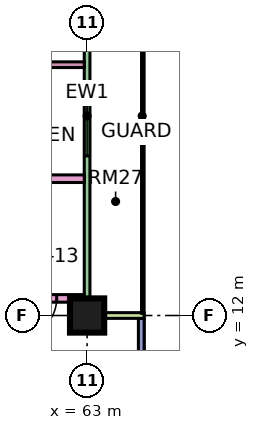
"""IFC4 building model, lengths in metres.
Left out: names, types, materials, properties, quantities, classifications, styles, units other than length and angle.
Written with IfcOpenShell. Run it as: python <this file> out.ifc"""

import sys

from ifc_helpers import new_model, si_unit, direction, frame, frame_2d, origin, origin_2d, place, context, subcontext, project, spatial, rectangle, extrude, element, fill, save


model = new_model("IFC4")
c1 = context("Model", 3, precision=1e-05, world=origin(), true_north=direction((0.0, 1.0)))
c2 = subcontext(c1, "Body", "Model", "MODEL_VIEW")
j1 = project(units=[si_unit("LENGTHUNIT", "METRE"), si_unit("PLANEANGLEUNIT", "RADIAN")], contexts=[c1])
p1 = place(None, origin())
s1 = spatial("IfcSite", under=j1, at=p1, CompositionType="ELEMENT")
p2 = place(p1, origin())
s2 = spatial("IfcBuilding", under=s1, at=p2, CompositionType="ELEMENT")
p3 = place(p2, frame((0.0, 0.0, 194.9)))
s3 = spatial("IfcBuildingStorey", under=s2, at=p3, CompositionType="ELEMENT", Elevation=194.9)
p4 = place(p3, frame((63.0, 12.0, 0.0), z_axis=(0.0, 0.0, 1.0), x_axis=(1.0, 0.0, 0.0)))
e1 = element("IfcColumn", 1, at=p4, inside=s3, PredefinedType="COLUMN", context=c2, shape_type="SweptSolid", body=[
    extrude(rectangle(XDim=0.9, YDim=0.9, at=origin_2d()), origin(), (0.0, 0.0, 1.0), 3.75),
])
p5 = place(p3, frame((64.425, 1.5, 0.0), z_axis=(0.0, 0.0, 1.0), x_axis=(0.0, 1.0, 0.0)))
e2 = element("IfcWall", 2, at=p5, inside=s3, PredefinedType="SOLIDWALL", context=c2, shape_type="SweptSolid", body=[
    extrude(rectangle(XDim=10.425, YDim=0.15, at=frame_2d((5.212, 0.0))), origin(), (0.0, 0.0, 1.0), 3.35),
])
p6 = place(p5, frame((3.712, 0.0, 0.45)))
e3 = element("IfcOpeningElement", 3, at=p6, cuts=e2, PredefinedType="OPENING", context=c2, shape_type="SweptSolid", body=[
    extrude(rectangle(XDim=3.0, YDim=2.4, at=frame_2d((1.5, 1.2))), frame((0.0, 0.085, 0.0), z_axis=(0.0, -1.0, 0.0), x_axis=(1.0, 0.0, 0.0)), (0.0, 0.0, 1.0), 0.17),
])
p7 = place(p3, frame((63.0, 12.075, 0.0), z_axis=(0.0, 0.0, 1.0), x_axis=(0.0, 1.0, 0.0)))
e4 = element("IfcWall", 4, at=p7, inside=s3, PredefinedType="SOLIDWALL", context=c2, shape_type="SweptSolid", body=[
    extrude(rectangle(XDim=10.35, YDim=0.15, at=frame_2d((5.175, 0.0))), origin(), (0.0, 0.0, 1.0), 3.35),
])
p8 = place(p7, frame((4.125, 0.0, 0.45)))
e5 = element("IfcOpeningElement", 5, at=p8, cuts=e4, PredefinedType="OPENING", context=c2, shape_type="SweptSolid", body=[
    extrude(rectangle(XDim=1.8, YDim=2.4, at=frame_2d((0.9, 1.2))), frame((0.0, 0.085, 0.0), z_axis=(0.0, -1.0, 0.0), x_axis=(1.0, 0.0, 0.0)), (0.0, 0.0, 1.0), 0.17),
])
p9 = place(p7, frame((8.137, 0.0, 0.45)))
e6 = element("IfcOpeningElement", 6, at=p9, cuts=e4, PredefinedType="OPENING", context=c2, shape_type="SweptSolid", body=[
    extrude(rectangle(XDim=1.8, YDim=2.4, at=frame_2d((0.9, 1.2))), frame((0.0, 0.085, 0.0), z_axis=(0.0, -1.0, 0.0), x_axis=(1.0, 0.0, 0.0)), (0.0, 0.0, 1.0), 0.17),
])
p10 = place(p3, frame((64.5, 12.0, 0.0), z_axis=(0.0, 0.0, 1.0), x_axis=(-1.0, 0.0, 0.0)))
e7 = element("IfcWall", 7, at=p10, inside=s3, PredefinedType="SOLIDWALL", context=c2, shape_type="SweptSolid", body=[
    extrude(rectangle(XDim=1.5, YDim=0.15, at=frame_2d((0.75, 0.0))), origin(), (0.0, 0.0, 1.0), 3.35),
])
p11 = place(p3, frame((40.65, 12.45, 0.0), z_axis=(0.0, 0.0, 1.0), x_axis=(1.0, 0.0, 0.0)))
e8 = element("IfcWall", 8, at=p11, inside=s3, PredefinedType="PARTITIONING", context=c2, shape_type="SweptSolid", body=[
    extrude(rectangle(XDim=22.276, YDim=0.2, at=frame_2d((11.138, 0.0))), origin(), (0.0, 0.0, 1.0), 3.35),
])
p12 = place(p11, frame((20.55, 0.0, 0.0)))
e9 = element("IfcOpeningElement", 9, at=p12, cuts=e8, PredefinedType="OPENING", context=c2, shape_type="SweptSolid", body=[
    extrude(rectangle(XDim=1.0, YDim=2.1, at=frame_2d((0.5, 1.05))), frame((0.0, 0.11, 0.0), z_axis=(0.0, -1.0, 0.0), x_axis=(1.0, 0.0, 0.0)), (0.0, 0.0, 1.0), 0.22),
])
p13 = place(p11, frame((1.05, 0.0, 0.0)))
e10 = element("IfcOpeningElement", 10, at=p13, cuts=e8, PredefinedType="OPENING", context=c2, shape_type="SweptSolid", body=[
    extrude(rectangle(XDim=1.0, YDim=2.1, at=frame_2d((0.5, 1.05))), frame((0.0, 0.11, 0.0), z_axis=(0.0, -1.0, 0.0), x_axis=(1.0, 0.0, 0.0)), (0.0, 0.0, 1.0), 0.22),
])
p14 = place(p3, frame((51.225, 15.6, 0.0), z_axis=(0.0, 0.0, 1.0), x_axis=(1.0, 0.0, 0.0)))
e11 = element("IfcWall", 11, at=p14, inside=s3, PredefinedType="PARTITIONING", context=c2, shape_type="SweptSolid", body=[
    extrude(rectangle(XDim=11.701, YDim=0.2, at=frame_2d((5.851, 0.0))), origin(), (0.0, 0.0, 1.0), 3.35),
])
p15 = place(p14, frame((3.575, 0.0, 0.0)))
e12 = element("IfcOpeningElement", 12, at=p15, cuts=e11, PredefinedType="OPENING", context=c2, shape_type="SweptSolid", body=[
    extrude(rectangle(XDim=1.0, YDim=2.1, at=frame_2d((0.5, 1.05))), frame((0.0, 0.11, 0.0), z_axis=(0.0, -1.0, 0.0), x_axis=(1.0, 0.0, 0.0)), (0.0, 0.0, 1.0), 0.22),
])
p16 = place(p14, frame((0.875, 0.0, 0.0)))
e13 = element("IfcOpeningElement", 13, at=p16, cuts=e11, PredefinedType="OPENING", context=c2, shape_type="SweptSolid", body=[
    extrude(rectangle(XDim=1.0, YDim=2.1, at=frame_2d((0.5, 1.05))), frame((0.0, 0.11, 0.0), z_axis=(0.0, -1.0, 0.0), x_axis=(1.0, 0.0, 0.0)), (0.0, 0.0, 1.0), 0.22),
])
p17 = place(p3, frame((56.625, 18.6, 0.0), z_axis=(0.0, 0.0, 1.0), x_axis=(1.0, 0.0, 0.0)))
e14 = element("IfcWall", 14, at=p17, inside=s3, PredefinedType="PARTITIONING", context=c2, shape_type="SweptSolid", body=[
    extrude(rectangle(XDim=6.301, YDim=0.15, at=frame_2d((3.15, 0.0))), origin(), (0.0, 0.0, 1.0), 3.35),
])
p18 = place(p17, frame((1.125, 0.0, 0.0)))
e15 = element("IfcOpeningElement", 15, at=p18, cuts=e14, PredefinedType="OPENING", context=c2, shape_type="SweptSolid", body=[
    extrude(rectangle(XDim=0.8, YDim=2.1, at=frame_2d((0.4, 1.05))), frame((0.0, 0.085, 0.0), z_axis=(0.0, -1.0, 0.0), x_axis=(1.0, 0.0, 0.0)), (0.0, 0.0, 1.0), 0.17),
])
p19 = place(p17, frame((4.275, 0.0, 0.0)))
e16 = element("IfcOpeningElement", 16, at=p19, cuts=e14, PredefinedType="OPENING", context=c2, shape_type="SweptSolid", body=[
    extrude(rectangle(XDim=0.9, YDim=2.1, at=frame_2d((0.45, 1.05))), frame((0.0, 0.085, 0.0), z_axis=(0.0, -1.0, 0.0), x_axis=(1.0, 0.0, 0.0)), (0.0, 0.0, 1.0), 0.17),
])
p20 = place(p8, origin())
e17 = element("IfcWindow", 17, at=p20, inside=s3, PartitioningType="SINGLE_PANEL", PredefinedType="WINDOW", context=c2, shape_type="SweptSolid", body=[
    extrude(rectangle(XDim=1.8, YDim=2.4, at=frame_2d((0.9, 1.2))), frame((0.0, 0.03, 0.0), z_axis=(0.0, -1.0, 0.0), x_axis=(1.0, 0.0, 0.0)), (0.0, 0.0, 1.0), 0.06),
])
fill(e5, e17)
p21 = place(p12, frame((1.0, 0.0, 0.0), z_axis=(0.0, 0.0, 1.0), x_axis=(-1.0, 0.0, 0.0)))
e18 = element("IfcDoor", 18, at=p21, inside=s3, OperationType="SINGLE_SWING_LEFT", PredefinedType="DOOR", context=c2, shape_type="SweptSolid", body=[
    extrude(rectangle(XDim=1.0, YDim=2.1, at=frame_2d((0.5, 1.05))), frame((0.0, 0.025, 0.0), z_axis=(0.0, -1.0, 0.0), x_axis=(1.0, 0.0, 0.0)), (0.0, 0.0, 1.0), 0.05),
])
fill(e9, e18)
save(model, sys.argv[1])
